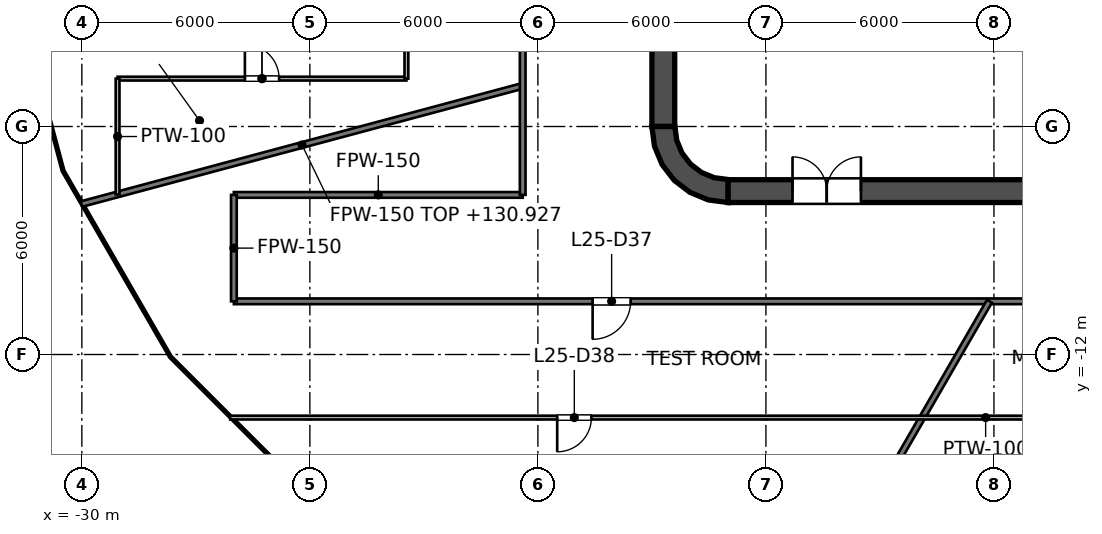
"""IFC4 building model, lengths in metres.
Left out: names, types, materials, properties, quantities, classifications, styles, units other than length and angle.
Written with IfcOpenShell. Run it as: python <this file> out.ifc"""

import sys

from ifc_helpers import new_model, si_unit, direction, frame, frame_2d, origin, place, context, subcontext, project, spatial, polyline, rectangle, outline, extrude, element, fill, save


model = new_model("IFC4")
c1 = context("Model", 3, precision=1e-05, world=origin(), true_north=direction((0.0, 1.0)))
c2 = subcontext(c1, "Body", "Model", "MODEL_VIEW")
j1 = project(units=[si_unit("LENGTHUNIT", "METRE"), si_unit("PLANEANGLEUNIT", "RADIAN")], contexts=[c1])
p1 = place(None, origin())
s1 = spatial("IfcSite", under=j1, at=p1, CompositionType="ELEMENT")
p2 = place(p1, origin())
s2 = spatial("IfcBuilding", under=s1, at=p2, CompositionType="ELEMENT")
p3 = place(p2, frame((0.0, 0.0, 127.2)))
s3 = spatial("IfcBuildingStorey", under=s2, at=p3, CompositionType="ELEMENT", Elevation=127.2)
p4 = place(p3, frame((-13.0, -7.7, 0.0), z_axis=(0.0, 0.0, 1.0), x_axis=(1.0, 0.0, 0.0)))
e1 = element("IfcWall", 1, at=p4, inside=s3, PredefinedType="SHEAR", context=c2, shape_type="SweptSolid", body=[
    extrude(rectangle(XDim=26.0, YDim=0.6, at=frame_2d((13.0, 0.0))), origin(), (0.0, 0.0, 1.0), 4.2),
])
p5 = place(p4, frame((1.7, 0.0, 0.0)))
e2 = element("IfcOpeningElement", 2, at=p5, cuts=e1, PredefinedType="OPENING", context=c2, shape_type="SweptSolid", body=[
    extrude(rectangle(XDim=1.8, YDim=2.1, at=frame_2d((0.9, 1.05))), frame((0.0, 0.3, 0.0), z_axis=(0.0, -1.0, 0.0), x_axis=(1.0, 0.0, 0.0)), (0.0, 0.0, 1.0), 0.6),
])
p6 = place(p4, frame((22.5, 0.0, 0.0)))
e3 = element("IfcOpeningElement", 3, at=p6, cuts=e1, PredefinedType="OPENING", context=c2, shape_type="SweptSolid", body=[
    extrude(rectangle(XDim=1.8, YDim=2.1, at=frame_2d((0.9, 1.05))), frame((0.0, 0.3, 0.0), z_axis=(0.0, -1.0, 0.0), x_axis=(1.0, 0.0, 0.0)), (0.0, 0.0, 1.0), 0.6),
])
p7 = place(p3, frame((-14.7, -6.0, 0.0), z_axis=(0.0, 0.0, 1.0), x_axis=(0.0, 1.0, 0.0)))
e4 = element("IfcWall", 4, at=p7, inside=s3, PredefinedType="SHEAR", context=c2, shape_type="SweptSolid", body=[
    extrude(rectangle(XDim=12.0, YDim=0.6, at=frame_2d((6.0, 0.0))), origin(), (0.0, 0.0, 1.0), 4.2),
])
p8 = place(p3, origin())
e5 = element("IfcWall", 5, at=p8, inside=s3, PredefinedType="SHEAR", context=c2, shape_type="SweptSolid", body=[
    extrude(outline(polyline([(-13.0, -8.0), (-13.0, -7.395), (-13.361, -7.347), (-13.698, -7.208), (-13.986, -6.986), (-14.208, -6.698), (-14.347, -6.361), (-14.395, -6.0), (-15.0, -6.0), (-14.932, -6.518), (-14.732, -7.0), (-14.414, -7.414), (-14.0, -7.732), (-13.518, -7.932), (-13.0, -8.0)])), origin(), (0.0, 0.0, 1.0), 4.2),
])
p9 = place(p3, frame((-9.0, -6.6, 0.0), z_axis=(0.0, 0.0, 1.0), x_axis=(0.0, 1.0, 0.0)))
e6 = element("IfcWall", 6, at=p9, inside=s3, PredefinedType="PARTITIONING", context=c2, shape_type="SweptSolid", body=[
    extrude(rectangle(XDim=2.5, YDim=0.25, at=frame_2d((1.25, 0.0))), origin(), (0.0, 0.0, 1.0), 4.05),
])
p10 = place(p9, frame((0.75, 0.0, 0.0)))
e7 = element("IfcOpeningElement", 7, at=p10, cuts=e6, PredefinedType="OPENING", context=c2, shape_type="SweptSolid", body=[
    extrude(rectangle(XDim=1.0, YDim=2.1, at=frame_2d((0.5, 1.05))), frame((0.0, 0.125, 0.0), z_axis=(0.0, -1.0, 0.0), x_axis=(1.0, 0.0, 0.0)), (0.0, 0.0, 1.0), 0.25),
])
p11 = place(p3, frame((-9.125, -7.0, 0.0), z_axis=(0.0, 0.0, 1.0), x_axis=(1.0, 0.0, 0.0)))
e8 = element("IfcWall", 8, at=p11, inside=s3, PredefinedType="SOLIDWALL", context=c2, shape_type="SweptSolid", body=[
    extrude(rectangle(XDim=18.25, YDim=0.8, at=frame_2d((9.125, 0.0))), origin(), (0.0, 0.0, 1.0), 4.05),
])
p12 = place(p3, frame((-9.125, -3.975, 0.0), z_axis=(0.0, 0.0, 1.0), x_axis=(1.0, 0.0, 0.0)))
e9 = element("IfcWall", 9, at=p12, inside=s3, PredefinedType="SOLIDWALL", context=c2, shape_type="SweptSolid", body=[
    extrude(rectangle(XDim=12.4, YDim=0.25, at=frame_2d((6.2, 0.0))), origin(), (0.0, 0.0, 1.0), 4.05),
])
p13 = place(p12, frame((1.05, 0.0, 0.0)))
e10 = element("IfcOpeningElement", 10, at=p13, cuts=e9, PredefinedType="OPENING", context=c2, shape_type="SweptSolid", body=[
    extrude(rectangle(XDim=1.2, YDim=2.1, at=frame_2d((0.6, 1.05))), frame((0.0, 0.125, 0.0), z_axis=(0.0, -1.0, 0.0), x_axis=(1.0, 0.0, 0.0)), (0.0, 0.0, 1.0), 0.25),
])
p14 = place(p12, frame((4.1, 0.0, 0.0)))
e11 = element("IfcOpeningElement", 11, at=p14, cuts=e9, PredefinedType="OPENING", context=c2, shape_type="SweptSolid", body=[
    extrude(rectangle(XDim=1.2, YDim=2.1, at=frame_2d((0.6, 1.05))), frame((0.0, 0.125, 0.0), z_axis=(0.0, -1.0, 0.0), x_axis=(1.0, 0.0, 0.0)), (0.0, 0.0, 1.0), 0.25),
])
p15 = place(p3, frame((-11.8, -7.4, 0.0), z_axis=(0.0, 0.0, 1.0), x_axis=(0.0, 1.0, 0.0)))
e12 = element("IfcWall", 12, at=p15, inside=s3, PredefinedType="SOLIDWALL", context=c2, shape_type="SweptSolid", body=[
    extrude(rectangle(XDim=14.8, YDim=0.4, at=frame_2d((7.4, 0.0))), origin(), (0.0, 0.0, 1.0), 4.05),
])
p16 = place(p15, frame((11.2, 0.0, 0.0)))
e13 = element("IfcOpeningElement", 13, at=p16, cuts=e12, PredefinedType="OPENING", context=c2, shape_type="SweptSolid", body=[
    extrude(rectangle(XDim=1.1, YDim=2.1, at=frame_2d((0.55, 1.05))), frame((0.0, 0.2, 0.0), z_axis=(0.0, -1.0, 0.0), x_axis=(1.0, 0.0, 0.0)), (0.0, 0.0, 1.0), 0.4),
])
p17 = place(p15, frame((8.3, 0.0, 0.0)))
e14 = element("IfcOpeningElement", 14, at=p17, cuts=e12, PredefinedType="OPENING", context=c2, shape_type="SweptSolid", body=[
    extrude(rectangle(XDim=1.1, YDim=2.1, at=frame_2d((0.55, 1.05))), frame((0.0, 0.2, 0.0), z_axis=(0.0, -1.0, 0.0), x_axis=(1.0, 0.0, 0.0)), (0.0, 0.0, 1.0), 0.4),
])
p18 = place(p15, frame((5.4, 0.0, 0.0)))
e15 = element("IfcOpeningElement", 15, at=p18, cuts=e12, PredefinedType="OPENING", context=c2, shape_type="SweptSolid", body=[
    extrude(rectangle(XDim=1.1, YDim=2.1, at=frame_2d((0.55, 1.05))), frame((0.0, 0.2, 0.0), z_axis=(0.0, -1.0, 0.0), x_axis=(1.0, 0.0, 0.0)), (0.0, 0.0, 1.0), 0.4),
])
p19 = place(p15, frame((13.552, 0.0, 0.0)))
e16 = element("IfcOpeningElement", 16, at=p19, cuts=e12, PredefinedType="OPENING", context=c2, shape_type="SweptSolid", body=[
    extrude(rectangle(XDim=0.9, YDim=2.1, at=frame_2d((0.45, 1.05))), frame((0.0, 0.2, 0.0), z_axis=(0.0, -1.0, 0.0), x_axis=(1.0, 0.0, 0.0)), (0.0, 0.0, 1.0), 0.4),
])
p20 = place(p15, frame((0.347, 0.0, 0.0)))
e17 = element("IfcOpeningElement", 17, at=p20, cuts=e12, PredefinedType="OPENING", context=c2, shape_type="SweptSolid", body=[
    extrude(rectangle(XDim=0.9, YDim=2.1, at=frame_2d((0.45, 1.05))), frame((0.0, 0.2, 0.0), z_axis=(0.0, -1.0, 0.0), x_axis=(1.0, 0.0, 0.0)), (0.0, 0.0, 1.0), 0.4),
])
e18 = element("IfcWall", 18, at=p8, inside=s3, PredefinedType="SOLIDWALL", context=c2, shape_type="SweptSolid", body=[
    extrude(outline(polyline([(-12.0, -5.925), (-12.0, -5.675), (-14.15, -5.675), (-14.15, -3.025), (-12.0, -3.025), (-12.0, -2.775), (-14.15, -2.775), (-14.15, -0.125), (-12.0, -0.125), (-12.0, 0.125), (-14.15, 0.125), (-14.15, 2.775), (-12.0, 2.775), (-12.0, 3.025), (-14.15, 3.025), (-14.15, 5.675), (-12.0, 5.675), (-12.0, 5.925), (-14.15, 5.925), (-14.4, 5.925), (-14.4, 5.675), (-14.4, 3.025), (-14.4, 2.775), (-14.4, 0.125), (-14.4, -0.125), (-14.4, -2.775), (-14.4, -3.025), (-14.4, -5.675), (-14.4, -5.925), (-14.15, -5.925), (-12.0, -5.925)])), origin(), (0.0, 0.0, 1.0), 4.05),
])
p21 = place(p3, frame((-26.0, -10.6, 0.0), z_axis=(0.0, 0.0, 1.0), x_axis=(1.0, 0.0, 0.0)))
e19 = element("IfcWall", 19, at=p21, inside=s3, PredefinedType="PARTITIONING", context=c2, shape_type="SweptSolid", body=[
    extrude(rectangle(XDim=52.0, YDim=0.15, at=frame_2d((26.0, 0.0))), origin(), (0.0, 0.0, 1.0), 3.127),
])
p22 = place(p21, frame((22.49, 0.0, 0.0)))
e20 = element("IfcOpeningElement", 20, at=p22, cuts=e19, PredefinedType="OPENING", context=c2, shape_type="SweptSolid", body=[
    extrude(rectangle(XDim=1.0, YDim=2.1, at=frame_2d((0.5, 1.05))), frame((0.0, 0.075, 0.0), z_axis=(0.0, -1.0, 0.0), x_axis=(1.0, 0.0, 0.0)), (0.0, 0.0, 1.0), 0.15),
])
p23 = place(p21, frame((30.8, 0.0, 0.0)))
e21 = element("IfcOpeningElement", 21, at=p23, cuts=e19, PredefinedType="OPENING", context=c2, shape_type="SweptSolid", body=[
    extrude(rectangle(XDim=1.0, YDim=2.1, at=frame_2d((0.5, 1.05))), frame((0.0, 0.075, 0.0), z_axis=(0.0, -1.0, 0.0), x_axis=(1.0, 0.0, 0.0)), (0.0, 0.0, 1.0), 0.15),
])
p24 = place(p21, frame((43.75, 0.0, 0.0)))
e22 = element("IfcOpeningElement", 22, at=p24, cuts=e19, PredefinedType="OPENING", context=c2, shape_type="SweptSolid", body=[
    extrude(rectangle(XDim=1.2, YDim=2.1, at=frame_2d((0.6, 1.05))), frame((0.0, 0.075, 0.0), z_axis=(0.0, -1.0, 0.0), x_axis=(1.0, 0.0, 0.0)), (0.0, 0.0, 1.0), 0.15),
])
p25 = place(p21, frame((9.44, 0.0, 0.0)))
e23 = element("IfcOpeningElement", 23, at=p25, cuts=e19, PredefinedType="OPENING", context=c2, shape_type="SweptSolid", body=[
    extrude(rectangle(XDim=1.0, YDim=2.1, at=frame_2d((0.5, 1.05))), frame((0.0, 0.075, 0.0), z_axis=(0.0, -1.0, 0.0), x_axis=(1.0, 0.0, 0.0)), (0.0, 0.0, 1.0), 0.15),
])
p26 = place(p3, frame((-26.0, -7.8, 0.0), z_axis=(0.0, 0.0, 1.0), x_axis=(1.0, 0.0, 0.0)))
e24 = element("IfcWall", 24, at=p26, inside=s3, PredefinedType="PARTITIONING", context=c2, shape_type="SweptSolid", body=[
    extrude(rectangle(XDim=7.6, YDim=0.15, at=frame_2d((3.8, 0.0))), origin(), (0.0, 0.0, 1.0), 3.195),
])
p27 = place(p3, frame((-30.012, -8.042, 0.0), z_axis=(0.0, 0.0, 1.0), x_axis=(0.965928199485, 0.25881018805, 0.0)))
e25 = element("IfcWall", 25, at=p27, inside=s3, PredefinedType="PARTITIONING", context=c2, shape_type="SweptSolid", body=[
    extrude(rectangle(XDim=12.022, YDim=0.15, at=frame_2d((6.011, 0.0))), origin(), (0.0, 0.0, 1.0), 3.727),
])
p28 = place(p3, frame((-12.67, -21.945, 0.0), z_axis=(0.0, 0.0, 1.0), x_axis=(0.500015519518, 0.866016443401, 0.0)))
e26 = element("IfcWall", 26, at=p28, inside=s3, PredefinedType="PARTITIONING", context=c2, shape_type="SweptSolid", body=[
    extrude(rectangle(XDim=13.1, YDim=0.15, at=frame_2d((6.55, 0.0))), origin(), (0.0, 0.0, 1.0), 3.502),
])
p29 = place(p3, frame((-18.4, -7.8, 0.0), z_axis=(0.0, 0.0, 1.0), x_axis=(0.0, 1.0, 0.0)))
e27 = element("IfcWall", 27, at=p29, inside=s3, PredefinedType="PARTITIONING", context=c2, shape_type="SweptSolid", body=[
    extrude(rectangle(XDim=15.6, YDim=0.15, at=frame_2d((7.8, 0.0))), origin(), (0.0, 0.0, 1.0), 3.127),
])
p30 = place(p29, frame((5.474, 0.0, 0.0)))
e28 = element("IfcOpeningElement", 28, at=p30, cuts=e27, PredefinedType="OPENING", context=c2, shape_type="SweptSolid", body=[
    extrude(rectangle(XDim=1.0, YDim=2.1, at=frame_2d((0.5, 1.05))), frame((0.0, 0.075, 0.0), z_axis=(0.0, -1.0, 0.0), x_axis=(1.0, 0.0, 0.0)), (0.0, 0.0, 1.0), 0.15),
])
p31 = place(p3, frame((-26.0, -10.6, 0.0), z_axis=(0.0, 0.0, 1.0), x_axis=(0.0, 1.0, 0.0)))
e29 = element("IfcWall", 29, at=p31, inside=s3, PredefinedType="PARTITIONING", context=c2, shape_type="SweptSolid", body=[
    extrude(rectangle(XDim=2.8, YDim=0.15, at=frame_2d((1.4, 0.0))), origin(), (0.0, 0.0, 1.0), 3.195),
])
p32 = place(p3, frame((-26.097, -13.66, 0.0), z_axis=(0.0, 0.0, 1.0), x_axis=(1.0, 0.0, 0.0)))
e30 = element("IfcWall", 30, at=p32, inside=s3, PredefinedType="PARTITIONING", context=c2, shape_type="SweptSolid", body=[
    extrude(rectangle(XDim=39.757, YDim=0.1, at=frame_2d((19.878, 0.0))), origin(), (0.0, 0.0, 1.0), 3.127),
])
p33 = place(p32, frame((32.027, 0.0, 0.0)))
e31 = element("IfcOpeningElement", 31, at=p33, cuts=e30, PredefinedType="OPENING", context=c2, shape_type="SweptSolid", body=[
    extrude(rectangle(XDim=1.8, YDim=2.1, at=frame_2d((0.9, 1.05))), frame((0.0, 0.05, 0.0), z_axis=(0.0, -1.0, 0.0), x_axis=(1.0, 0.0, 0.0)), (0.0, 0.0, 1.0), 0.1),
])
p34 = place(p32, frame((8.605, 0.0, 0.0)))
e32 = element("IfcOpeningElement", 32, at=p34, cuts=e30, PredefinedType="OPENING", context=c2, shape_type="SweptSolid", body=[
    extrude(rectangle(XDim=0.9, YDim=2.1, at=frame_2d((0.45, 1.05))), frame((0.0, 0.05, 0.0), z_axis=(0.0, -1.0, 0.0), x_axis=(1.0, 0.0, 0.0)), (0.0, 0.0, 1.0), 0.1),
])
p35 = place(p3, frame((-29.06, -4.74, 0.0), z_axis=(0.0, 0.0, 1.0), x_axis=(1.0, 0.0, 0.0)))
e33 = element("IfcWall", 33, at=p35, inside=s3, PredefinedType="PARTITIONING", context=c2, shape_type="SweptSolid", body=[
    extrude(rectangle(XDim=7.6, YDim=0.1, at=frame_2d((3.8, 0.0))), origin(), (0.0, 0.0, 1.0), 4.05),
])
p36 = place(p35, frame((3.35, 0.0, 0.0)))
e34 = element("IfcOpeningElement", 34, at=p36, cuts=e33, PredefinedType="OPENING", context=c2, shape_type="SweptSolid", body=[
    extrude(rectangle(XDim=0.9, YDim=2.1, at=frame_2d((0.45, 1.05))), frame((0.0, 0.05, 0.0), z_axis=(0.0, -1.0, 0.0), x_axis=(1.0, 0.0, 0.0)), (0.0, 0.0, 1.0), 0.1),
])
p37 = place(p3, frame((-21.46, -4.74, 0.0), z_axis=(0.0, 0.0, 1.0), x_axis=(0.0, 1.0, 0.0)))
e35 = element("IfcWall", 35, at=p37, inside=s3, PredefinedType="PARTITIONING", context=c2, shape_type="SweptSolid", body=[
    extrude(rectangle(XDim=9.48, YDim=0.1, at=frame_2d((4.74, 0.0))), origin(), (0.0, 0.0, 1.0), 3.127),
])
p38 = place(p3, frame((-29.06, -7.787, 0.0), z_axis=(0.0, 0.0, 1.0), x_axis=(0.0, 1.0, 0.0)))
e36 = element("IfcWall", 36, at=p38, inside=s3, PredefinedType="PARTITIONING", context=c2, shape_type="SweptSolid", body=[
    extrude(rectangle(XDim=3.047, YDim=0.1, at=frame_2d((1.523, 0.0))), origin(), (0.0, 0.0, 1.0), 3.127),
])
p39 = place(p10, origin())
e37 = element("IfcDoor", 37, at=p39, inside=s3, OperationType="SINGLE_SWING_LEFT", PredefinedType="DOOR", context=c2, shape_type="SweptSolid", body=[
    extrude(rectangle(XDim=1.0, YDim=2.1, at=frame_2d((0.5, 1.05))), frame((0.0, 0.025, 0.0), z_axis=(0.0, -1.0, 0.0), x_axis=(1.0, 0.0, 0.0)), (0.0, 0.0, 1.0), 0.05),
])
fill(e7, e37)
p40 = place(p20, origin())
e38 = element("IfcDoor", 38, at=p40, inside=s3, OperationType="SINGLE_SWING_LEFT", PredefinedType="DOOR", context=c2, shape_type="SweptSolid", body=[
    extrude(rectangle(XDim=0.9, YDim=2.1, at=frame_2d((0.45, 1.05))), frame((0.0, 0.025, 0.0), z_axis=(0.0, -1.0, 0.0), x_axis=(1.0, 0.0, 0.0)), (0.0, 0.0, 1.0), 0.05),
])
fill(e17, e38)
p41 = place(p5, origin())
e39 = element("IfcDoor", 39, at=p41, inside=s3, OperationType="DOUBLE_DOOR_SINGLE_SWING", PredefinedType="DOOR", context=c2, shape_type="SweptSolid", body=[
    extrude(rectangle(XDim=1.8, YDim=2.1, at=frame_2d((0.9, 1.05))), frame((0.0, 0.025, 0.0), z_axis=(0.0, -1.0, 0.0), x_axis=(1.0, 0.0, 0.0)), (0.0, 0.0, 1.0), 0.05),
])
fill(e2, e39)
p42 = place(p36, origin())
e40 = element("IfcDoor", 40, at=p42, inside=s3, OperationType="SINGLE_SWING_LEFT", PredefinedType="DOOR", context=c2, shape_type="SweptSolid", body=[
    extrude(rectangle(XDim=0.9, YDim=2.1, at=frame_2d((0.45, 1.05))), frame((0.0, 0.025, 0.0), z_axis=(0.0, -1.0, 0.0), x_axis=(1.0, 0.0, 0.0)), (0.0, 0.0, 1.0), 0.05),
])
fill(e34, e40)
p43 = place(p25, origin())
e41 = element("IfcDoor", 41, at=p43, inside=s3, OperationType="SINGLE_SWING_LEFT", PredefinedType="DOOR", context=c2, shape_type="SweptSolid", body=[
    extrude(rectangle(XDim=1.0, YDim=2.1, at=frame_2d((0.5, 1.05))), frame((0.0, 0.025, 0.0), z_axis=(0.0, -1.0, 0.0), x_axis=(1.0, 0.0, 0.0)), (0.0, 0.0, 1.0), 0.05),
])
fill(e23, e41)
p44 = place(p34, origin())
e42 = element("IfcDoor", 42, at=p44, inside=s3, OperationType="SINGLE_SWING_LEFT", PredefinedType="DOOR", context=c2, shape_type="SweptSolid", body=[
    extrude(rectangle(XDim=0.9, YDim=2.1, at=frame_2d((0.45, 1.05))), frame((0.0, 0.025, 0.0), z_axis=(0.0, -1.0, 0.0), x_axis=(1.0, 0.0, 0.0)), (0.0, 0.0, 1.0), 0.05),
])
fill(e32, e42)
save(model, sys.argv[1])
